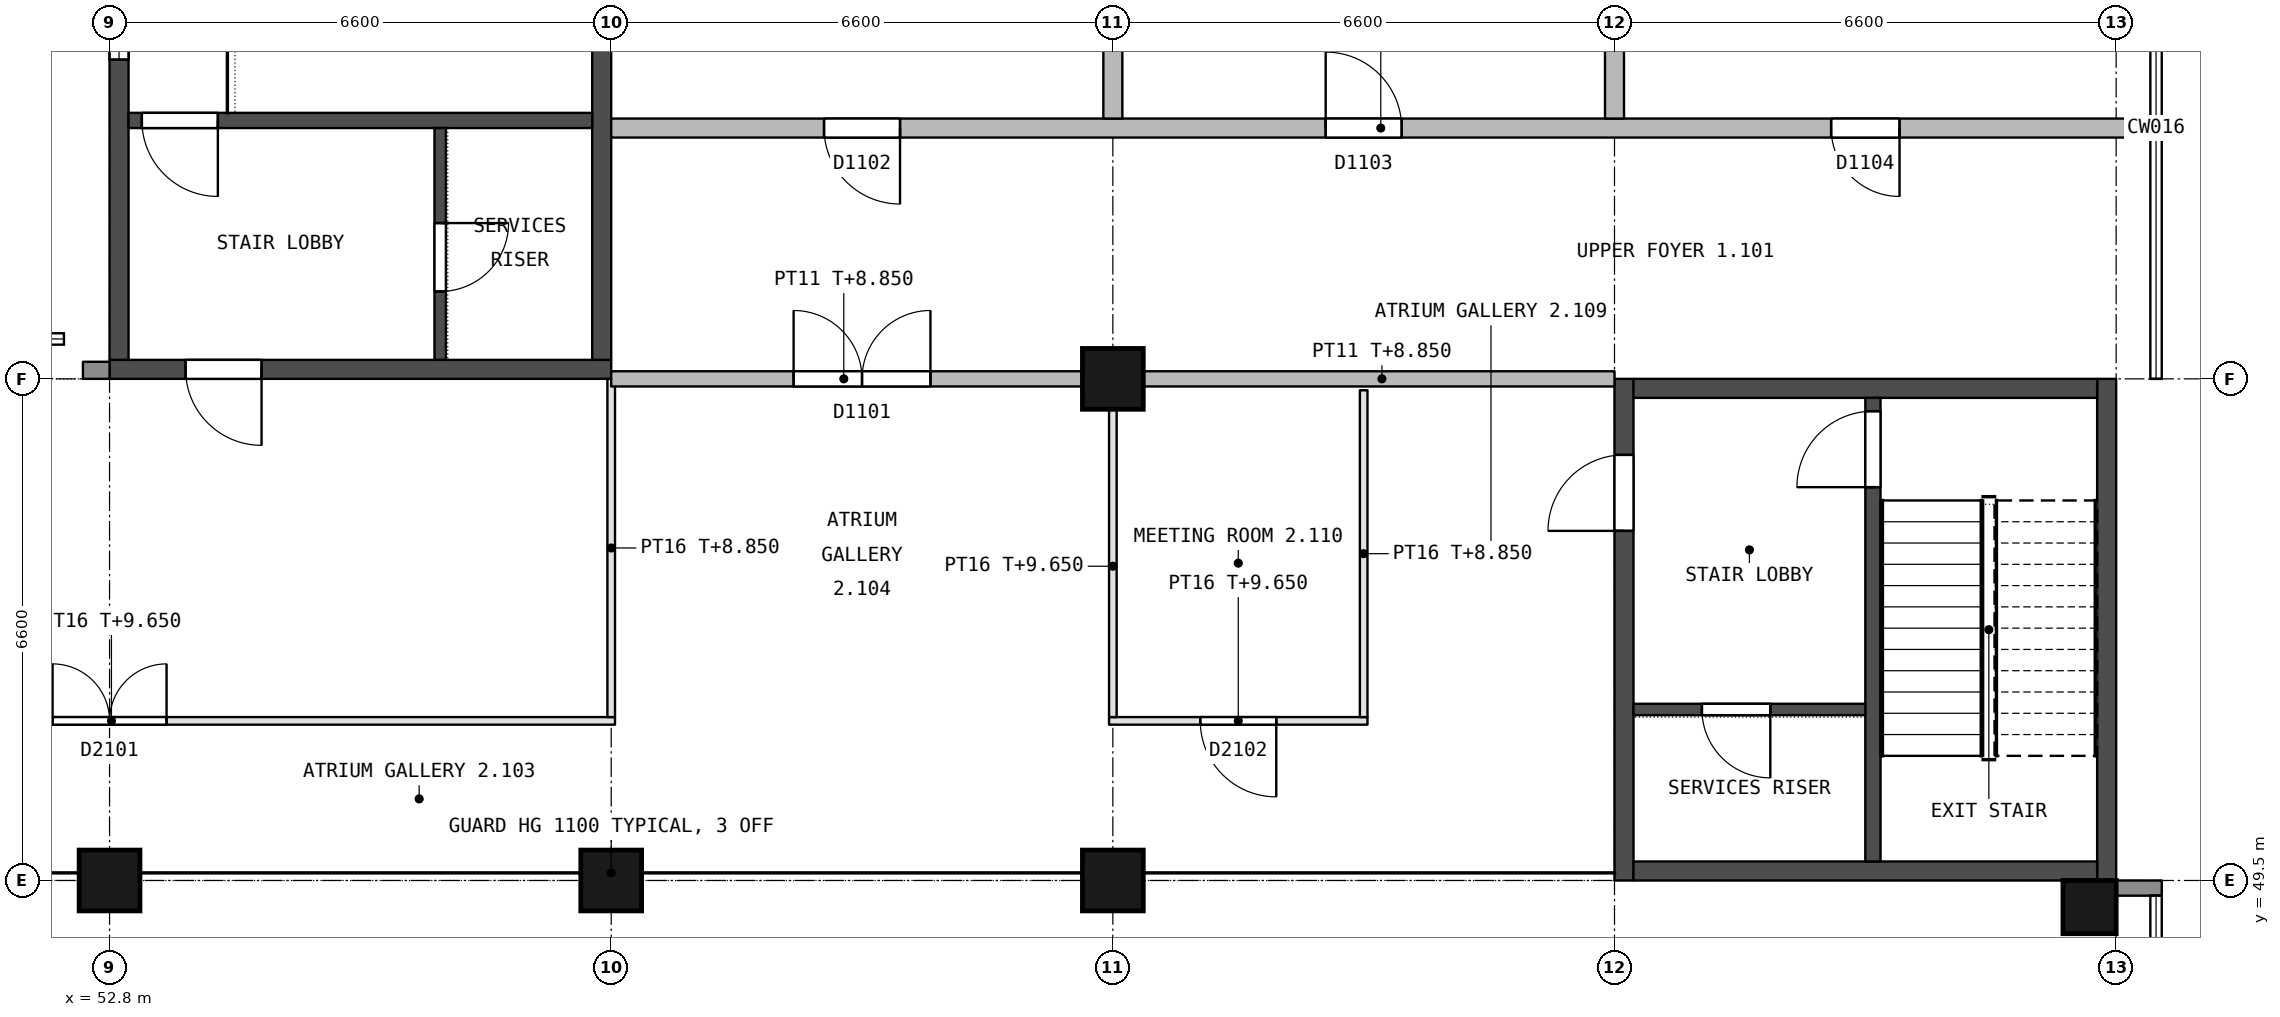
"""IFC4 building model, lengths in metres.
Left out: names, types, materials, properties, quantities, classifications, styles, units other than length and angle.
Written with IfcOpenShell. Run it as: python <this file> out.ifc"""

import sys

from ifc_helpers import new_model, si_unit, direction, frame, frame_2d, origin, origin_2d, place, context, subcontext, project, spatial, rectangle, extrude, element, fill, save


model = new_model("IFC4")
c1 = context("Model", 3, precision=1e-05, world=origin(), true_north=direction((0.0, 1.0)))
c2 = subcontext(c1, "Body", "Model", "MODEL_VIEW")
j1 = project(units=[si_unit("LENGTHUNIT", "METRE"), si_unit("PLANEANGLEUNIT", "RADIAN")], contexts=[c1])
p1 = place(None, origin())
s1 = spatial("IfcSite", under=j1, at=p1, CompositionType="ELEMENT")
p2 = place(p1, origin())
s2 = spatial("IfcBuilding", under=s1, at=p2, CompositionType="ELEMENT")
p3 = place(p2, frame((0.0, 0.0, 5.4)))
s3 = spatial("IfcBuildingStorey", under=s2, at=p3, CompositionType="ELEMENT", Elevation=5.4)
p4 = place(p3, frame((66.0, 56.1, 0.0), z_axis=(0.0, 0.0, 1.0), x_axis=(1.0, 0.0, 0.0)))
e1 = element("IfcColumn", 1, at=p4, inside=s3, PredefinedType="COLUMN", context=c2, shape_type="SweptSolid", body=[
    extrude(rectangle(XDim=0.8, YDim=0.8, at=origin_2d()), origin(), (0.0, 0.0, 1.0), 4.5),
])
p5 = place(p3, frame((78.85, 49.15, 0.0), z_axis=(0.0, 0.0, 1.0), x_axis=(1.0, 0.0, 0.0)))
e2 = element("IfcColumn", 2, at=p5, inside=s3, PredefinedType="COLUMN", context=c2, shape_type="SweptSolid", body=[
    extrude(rectangle(XDim=0.7, YDim=0.7, at=origin_2d()), origin(), (0.0, 0.0, 1.0), 4.5),
])
for number, where, z_axis, x_axis in (
    (3, (52.8, 49.5, 0.0), (0.0, 0.0, 1.0), (1.0, 0.0, 0.0)),
    (4, (59.4, 49.5, 0.0), (0.0, 0.0, 1.0), (1.0, 0.0, 0.0)),
    (5, (66.0, 49.5, 0.0), (0.0, 0.0, 1.0), (1.0, 0.0, 0.0)),
):
    element("IfcColumn", number, at=place(p3, frame(where, z_axis=z_axis, x_axis=x_axis)), inside=s3, PredefinedType="COLUMN", context=c2, shape_type="SweptSolid", body=[
        extrude(rectangle(XDim=0.8, YDim=0.8, at=origin_2d()), origin(), (0.0, 0.0, 1.0), 4.5),
    ])
p6 = place(p3, frame((72.725, 56.1, 0.0), z_axis=(0.0, 0.0, 1.0), x_axis=(0.0, -1.0, 0.0)))
e6 = element("IfcWall", 6, at=p6, inside=s3, PredefinedType="SHEAR", context=c2, shape_type="SweptSolid", body=[
    extrude(rectangle(XDim=6.6, YDim=0.25, at=frame_2d((3.3, 0.0))), origin(), (0.0, 0.0, 1.0), 4.25),
])
p7 = place(p6, frame((1.0, 0.0, 0.0)))
e7 = element("IfcOpeningElement", 7, at=p7, cuts=e6, PredefinedType="OPENING", context=c2, shape_type="SweptSolid", body=[
    extrude(rectangle(XDim=1.0, YDim=2.1, at=frame_2d((0.5, 1.05))), frame((0.0, 0.135, 0.0), z_axis=(0.0, -1.0, 0.0), x_axis=(1.0, 0.0, 0.0)), (0.0, 0.0, 1.0), 0.27),
])
p8 = place(p3, frame((79.075, 56.1, 0.0), z_axis=(0.0, 0.0, 1.0), x_axis=(0.0, -1.0, 0.0)))
e8 = element("IfcWall", 8, at=p8, inside=s3, PredefinedType="SHEAR", context=c2, shape_type="SweptSolid", body=[
    extrude(rectangle(XDim=6.6, YDim=0.25, at=frame_2d((3.3, 0.0))), origin(), (0.0, 0.0, 1.0), 4.25),
])
for number, where, z_axis, x_axis in (
    (9, (72.85, 55.975, 0.0), (0.0, 0.0, 1.0), (1.0, 0.0, 0.0)),
    (10, (72.85, 49.625, 0.0), (0.0, 0.0, 1.0), (1.0, 0.0, 0.0)),
):
    element("IfcWall", number, at=place(p3, frame(where, z_axis=z_axis, x_axis=x_axis)), inside=s3, PredefinedType="SHEAR", context=c2, shape_type="SweptSolid", body=[
        extrude(rectangle(XDim=6.1, YDim=0.25, at=frame_2d((3.05, 0.0))), origin(), (0.0, 0.0, 1.0), 4.25),
    ])
p9 = place(p3, frame((76.0, 55.85, 0.0), z_axis=(0.0, 0.0, 1.0), x_axis=(0.0, -1.0, 0.0)))
e11 = element("IfcWall", 11, at=p9, inside=s3, PredefinedType="SHEAR", context=c2, shape_type="SweptSolid", body=[
    extrude(rectangle(XDim=6.1, YDim=0.2, at=frame_2d((3.05, 0.0))), origin(), (0.0, 0.0, 1.0), 4.25),
])
p10 = place(p9, frame((0.175, 0.0, 0.0)))
e12 = element("IfcOpeningElement", 12, at=p10, cuts=e11, PredefinedType="OPENING", context=c2, shape_type="SweptSolid", body=[
    extrude(rectangle(XDim=1.0, YDim=2.1, at=frame_2d((0.5, 1.05))), frame((0.0, 0.11, 0.0), z_axis=(0.0, -1.0, 0.0), x_axis=(1.0, 0.0, 0.0)), (0.0, 0.0, 1.0), 0.22),
])
p11 = place(p3, frame((72.85, 51.75, 0.0), z_axis=(0.0, 0.0, 1.0), x_axis=(1.0, 0.0, 0.0)))
e13 = element("IfcWall", 13, at=p11, inside=s3, PredefinedType="SHEAR", context=c2, shape_type="SweptSolid", body=[
    extrude(rectangle(XDim=3.05, YDim=0.15, at=frame_2d((1.525, 0.0))), origin(), (0.0, 0.0, 1.0), 4.25),
])
p12 = place(p11, frame((0.9, 0.0, 0.0)))
e14 = element("IfcOpeningElement", 14, at=p12, cuts=e13, PredefinedType="OPENING", context=c2, shape_type="SweptSolid", body=[
    extrude(rectangle(XDim=0.9, YDim=2.1, at=frame_2d((0.45, 1.05))), frame((0.0, 0.085, 0.0), z_axis=(0.0, -1.0, 0.0), x_axis=(1.0, 0.0, 0.0)), (0.0, 0.0, 1.0), 0.17),
])
p13 = place(p3, frame((52.8, 56.225, 0.0), z_axis=(0.0, 0.0, 1.0), x_axis=(1.0, 0.0, 0.0)))
e15 = element("IfcWall", 15, at=p13, inside=s3, PredefinedType="SHEAR", context=c2, shape_type="SweptSolid", body=[
    extrude(rectangle(XDim=6.6, YDim=0.25, at=frame_2d((3.3, 0.0))), origin(), (0.0, 0.0, 1.0), 4.25),
])
p14 = place(p13, frame((1.0, 0.0, 0.0)))
e16 = element("IfcOpeningElement", 16, at=p14, cuts=e15, PredefinedType="OPENING", context=c2, shape_type="SweptSolid", body=[
    extrude(rectangle(XDim=1.0, YDim=2.1, at=frame_2d((0.5, 1.05))), frame((0.0, 0.135, 0.0), z_axis=(0.0, -1.0, 0.0), x_axis=(1.0, 0.0, 0.0)), (0.0, 0.0, 1.0), 0.27),
])
p15 = place(p3, frame((52.925, 56.35, 0.0), z_axis=(0.0, 0.0, 1.0), x_axis=(0.0, 1.0, 0.0)))
e17 = element("IfcWall", 17, at=p15, inside=s3, PredefinedType="SHEAR", context=c2, shape_type="SweptSolid", body=[
    extrude(rectangle(XDim=6.1, YDim=0.25, at=frame_2d((3.05, 0.0))), origin(), (0.0, 0.0, 1.0), 4.25),
])
p16 = place(p15, frame((3.95, 0.0, 0.7)))
e18 = element("IfcOpeningElement", 18, at=p16, cuts=e17, PredefinedType="OPENING", context=c2, shape_type="SweptSolid", body=[
    extrude(rectangle(XDim=1.1, YDim=1.5, at=frame_2d((0.55, 0.75))), frame((0.0, 0.135, 0.0), z_axis=(0.0, -1.0, 0.0), x_axis=(1.0, 0.0, 0.0)), (0.0, 0.0, 1.0), 0.27),
])
p17 = place(p3, frame((59.275, 56.35, 0.0), z_axis=(0.0, 0.0, 1.0), x_axis=(0.0, 1.0, 0.0)))
e19 = element("IfcWall", 19, at=p17, inside=s3, PredefinedType="SHEAR", context=c2, shape_type="SweptSolid", body=[
    extrude(rectangle(XDim=6.1, YDim=0.25, at=frame_2d((3.05, 0.0))), origin(), (0.0, 0.0, 1.0), 4.25),
])
p18 = place(p3, frame((53.05, 59.5, 0.0), z_axis=(0.0, 0.0, 1.0), x_axis=(1.0, 0.0, 0.0)))
e20 = element("IfcWall", 20, at=p18, inside=s3, PredefinedType="SHEAR", context=c2, shape_type="SweptSolid", body=[
    extrude(rectangle(XDim=6.1, YDim=0.2, at=frame_2d((3.05, 0.0))), origin(), (0.0, 0.0, 1.0), 4.25),
])
p19 = place(p18, frame((0.175, 0.0, 0.0)))
e21 = element("IfcOpeningElement", 21, at=p19, cuts=e20, PredefinedType="OPENING", context=c2, shape_type="SweptSolid", body=[
    extrude(rectangle(XDim=1.0, YDim=2.1, at=frame_2d((0.5, 1.05))), frame((0.0, 0.11, 0.0), z_axis=(0.0, -1.0, 0.0), x_axis=(1.0, 0.0, 0.0)), (0.0, 0.0, 1.0), 0.22),
])
p20 = place(p3, frame((57.15, 56.35, 0.0), z_axis=(0.0, 0.0, 1.0), x_axis=(0.0, 1.0, 0.0)))
e22 = element("IfcWall", 22, at=p20, inside=s3, PredefinedType="SHEAR", context=c2, shape_type="SweptSolid", body=[
    extrude(rectangle(XDim=3.05, YDim=0.15, at=frame_2d((1.525, 0.0))), origin(), (0.0, 0.0, 1.0), 4.25),
])
p21 = place(p20, frame((0.9, 0.0, 0.0)))
e23 = element("IfcOpeningElement", 23, at=p21, cuts=e22, PredefinedType="OPENING", context=c2, shape_type="SweptSolid", body=[
    extrude(rectangle(XDim=0.9, YDim=2.1, at=frame_2d((0.45, 1.05))), frame((0.0, 0.085, 0.0), z_axis=(0.0, -1.0, 0.0), x_axis=(1.0, 0.0, 0.0)), (0.0, 0.0, 1.0), 0.17),
])
p22 = place(p3, frame((52.625, 56.1, 0.0), z_axis=(0.0, 0.0, 1.0), x_axis=(0.0, 1.0, 0.0)))
e24 = element("IfcWall", 24, at=p22, inside=s3, PredefinedType="STANDARD", context=c2, shape_type="SweptSolid", body=[
    extrude(rectangle(XDim=0.225, YDim=0.35, at=frame_2d((0.112, 0.0))), origin(), (0.0, 0.0, 1.0), 3.45),
])
p23 = place(p3, frame((79.2, 49.4, 0.0), z_axis=(0.0, 0.0, 1.0), x_axis=(1.0, 0.0, 0.0)))
e25 = element("IfcWall", 25, at=p23, inside=s3, PredefinedType="STANDARD", context=c2, shape_type="SweptSolid", body=[
    extrude(rectangle(XDim=0.6, YDim=0.2, at=frame_2d((0.3, 0.0))), origin(), (0.0, 0.0, 1.0), 4.5),
])
p24 = place(p3, frame((46.2, 51.6, 0.0), z_axis=(0.0, 0.0, 1.0), x_axis=(1.0, 0.0, 0.0)))
e26 = element("IfcWall", 26, at=p24, inside=s3, PredefinedType="PARTITIONING", context=c2, shape_type="SweptSolid", body=[
    extrude(rectangle(XDim=13.25, YDim=0.1, at=frame_2d((6.625, 0.0))), origin(), (0.0, 0.0, 1.0), 4.25),
])
p25 = place(p24, frame((5.85, 0.0, 0.0)))
e27 = element("IfcOpeningElement", 27, at=p25, cuts=e26, PredefinedType="OPENING", context=c2, shape_type="SweptSolid", body=[
    extrude(rectangle(XDim=1.5, YDim=2.1, at=frame_2d((0.75, 1.05))), frame((0.0, 0.06, 0.0), z_axis=(0.0, -1.0, 0.0), x_axis=(1.0, 0.0, 0.0)), (0.0, 0.0, 1.0), 0.12),
])
p26 = place(p3, frame((65.95, 51.6, 0.0), z_axis=(0.0, 0.0, 1.0), x_axis=(1.0, 0.0, 0.0)))
e28 = element("IfcWall", 28, at=p26, inside=s3, PredefinedType="PARTITIONING", context=c2, shape_type="SweptSolid", body=[
    extrude(rectangle(XDim=3.4, YDim=0.1, at=frame_2d((1.7, 0.0))), origin(), (0.0, 0.0, 1.0), 4.25),
])
p27 = place(p26, frame((1.2, 0.0, 0.0)))
e29 = element("IfcOpeningElement", 29, at=p27, cuts=e28, PredefinedType="OPENING", context=c2, shape_type="SweptSolid", body=[
    extrude(rectangle(XDim=1.0, YDim=2.1, at=frame_2d((0.5, 1.05))), frame((0.0, 0.06, 0.0), z_axis=(0.0, -1.0, 0.0), x_axis=(1.0, 0.0, 0.0)), (0.0, 0.0, 1.0), 0.12),
])
p28 = place(p3, frame((59.4, 51.65, 0.0), z_axis=(0.0, 0.0, 1.0), x_axis=(0.0, 1.0, 0.0)))
e30 = element("IfcWall", 30, at=p28, inside=s3, PredefinedType="PARTITIONING", context=c2, shape_type="SweptSolid", body=[
    extrude(rectangle(XDim=4.45, YDim=0.1, at=frame_2d((2.225, 0.0))), origin(), (0.0, 0.0, 1.0), 3.45),
])
p29 = place(p3, frame((66.0, 51.65, 0.0), z_axis=(0.0, 0.0, 1.0), x_axis=(0.0, 1.0, 0.0)))
e31 = element("IfcWall", 31, at=p29, inside=s3, PredefinedType="PARTITIONING", context=c2, shape_type="SweptSolid", body=[
    extrude(rectangle(XDim=4.05, YDim=0.1, at=frame_2d((2.025, 0.0))), origin(), (0.0, 0.0, 1.0), 4.25),
])
p30 = place(p3, frame((69.3, 51.65, 0.0), z_axis=(0.0, 0.0, 1.0), x_axis=(0.0, 1.0, 0.0)))
e32 = element("IfcWall", 32, at=p30, inside=s3, PredefinedType="PARTITIONING", context=c2, shape_type="SweptSolid", body=[
    extrude(rectangle(XDim=4.3, YDim=0.1, at=frame_2d((2.15, 0.0))), origin(), (0.0, 0.0, 1.0), 3.45),
])
p31 = place(p3, frame((59.4, 56.1, 0.0), z_axis=(0.0, 0.0, 1.0), x_axis=(1.0, 0.0, 0.0)))
e33 = element("IfcWall", 33, at=p31, inside=s3, PredefinedType="PARTITIONING", context=c2, shape_type="SweptSolid", body=[
    extrude(rectangle(XDim=6.2, YDim=0.2, at=frame_2d((3.1, 0.0))), origin(), (0.0, 0.0, 1.0), 3.45),
])
p32 = place(p31, frame((2.4, 0.0, 0.0)))
e34 = element("IfcOpeningElement", 34, at=p32, cuts=e33, PredefinedType="OPENING", context=c2, shape_type="SweptSolid", body=[
    extrude(rectangle(XDim=1.8, YDim=2.1, at=frame_2d((0.9, 1.05))), frame((0.0, 0.11, 0.0), z_axis=(0.0, -1.0, 0.0), x_axis=(1.0, 0.0, 0.0)), (0.0, 0.0, 1.0), 0.22),
])
p33 = place(p3, frame((66.4, 56.1, 0.0), z_axis=(0.0, 0.0, 1.0), x_axis=(1.0, 0.0, 0.0)))
e35 = element("IfcWall", 35, at=p33, inside=s3, PredefinedType="PARTITIONING", context=c2, shape_type="SweptSolid", body=[
    extrude(rectangle(XDim=6.2, YDim=0.2, at=frame_2d((3.1, 0.0))), origin(), (0.0, 0.0, 1.0), 3.45),
])
p34 = place(p3, frame((59.4, 59.4, 0.0), z_axis=(0.0, 0.0, 1.0), x_axis=(1.0, 0.0, 0.0)))
e36 = element("IfcWall", 36, at=p34, inside=s3, PredefinedType="PARTITIONING", context=c2, shape_type="SweptSolid", body=[
    extrude(rectangle(XDim=20.25, YDim=0.25, at=frame_2d((10.125, 0.0))), origin(), (0.0, 0.0, 1.0), 4.5),
])
p35 = place(p34, frame((2.8, 0.0, 0.0)))
e37 = element("IfcOpeningElement", 37, at=p35, cuts=e36, PredefinedType="OPENING", context=c2, shape_type="SweptSolid", body=[
    extrude(rectangle(XDim=1.0, YDim=2.1, at=frame_2d((0.5, 1.05))), frame((0.0, 0.135, 0.0), z_axis=(0.0, -1.0, 0.0), x_axis=(1.0, 0.0, 0.0)), (0.0, 0.0, 1.0), 0.27),
])
p36 = place(p34, frame((9.4, 0.0, 0.0)))
e38 = element("IfcOpeningElement", 38, at=p36, cuts=e36, PredefinedType="OPENING", context=c2, shape_type="SweptSolid", body=[
    extrude(rectangle(XDim=1.0, YDim=2.1, at=frame_2d((0.5, 1.05))), frame((0.0, 0.135, 0.0), z_axis=(0.0, -1.0, 0.0), x_axis=(1.0, 0.0, 0.0)), (0.0, 0.0, 1.0), 0.27),
])
p37 = place(p34, frame((16.05, 0.0, 0.0)))
e39 = element("IfcOpeningElement", 39, at=p37, cuts=e36, PredefinedType="OPENING", context=c2, shape_type="SweptSolid", body=[
    extrude(rectangle(XDim=0.9, YDim=2.1, at=frame_2d((0.45, 1.05))), frame((0.0, 0.135, 0.0), z_axis=(0.0, -1.0, 0.0), x_axis=(1.0, 0.0, 0.0)), (0.0, 0.0, 1.0), 0.27),
])
for number, where, z_axis, x_axis in (
    (40, (66.0, 59.525, 0.0), (0.0, 0.0, 1.0), (0.0, 1.0, 0.0)),
    (41, (72.6, 59.525, 0.0), (0.0, 0.0, 1.0), (0.0, 1.0, 0.0)),
):
    element("IfcWall", number, at=place(p3, frame(where, z_axis=z_axis, x_axis=x_axis)), inside=s3, PredefinedType="PARTITIONING", context=c2, shape_type="SweptSolid", body=[
        extrude(rectangle(XDim=2.825, YDim=0.25, at=frame_2d((1.413, 0.0))), origin(), (0.0, 0.0, 1.0), 4.5),
    ])
p38 = place(p12, origin())
e42 = element("IfcDoor", 42, at=p38, inside=s3, OperationType="SINGLE_SWING_RIGHT", PredefinedType="DOOR", context=c2, shape_type="SweptSolid", body=[
    extrude(rectangle(XDim=0.9, YDim=2.1, at=frame_2d((0.45, 1.05))), frame((0.0, 0.025, 0.0), z_axis=(0.0, -1.0, 0.0), x_axis=(1.0, 0.0, 0.0)), (0.0, 0.0, 1.0), 0.05),
])
fill(e14, e42)
p39 = place(p7, origin())
e43 = element("IfcDoor", 43, at=p39, inside=s3, OperationType="SINGLE_SWING_RIGHT", PredefinedType="DOOR", context=c2, shape_type="SweptSolid", body=[
    extrude(rectangle(XDim=1.0, YDim=2.1, at=frame_2d((0.5, 1.05))), frame((0.0, 0.025, 0.0), z_axis=(0.0, -1.0, 0.0), x_axis=(1.0, 0.0, 0.0)), (0.0, 0.0, 1.0), 0.05),
])
fill(e7, e43)
p40 = place(p10, origin())
e44 = element("IfcDoor", 44, at=p40, inside=s3, OperationType="SINGLE_SWING_RIGHT", PredefinedType="DOOR", context=c2, shape_type="SweptSolid", body=[
    extrude(rectangle(XDim=1.0, YDim=2.1, at=frame_2d((0.5, 1.05))), frame((0.0, 0.025, 0.0), z_axis=(0.0, -1.0, 0.0), x_axis=(1.0, 0.0, 0.0)), (0.0, 0.0, 1.0), 0.05),
])
fill(e12, e44)
p41 = place(p21, origin())
e45 = element("IfcDoor", 45, at=p41, inside=s3, OperationType="SINGLE_SWING_RIGHT", PredefinedType="DOOR", context=c2, shape_type="SweptSolid", body=[
    extrude(rectangle(XDim=0.9, YDim=2.1, at=frame_2d((0.45, 1.05))), frame((0.0, 0.025, 0.0), z_axis=(0.0, -1.0, 0.0), x_axis=(1.0, 0.0, 0.0)), (0.0, 0.0, 1.0), 0.05),
])
fill(e23, e45)
p42 = place(p14, origin())
e46 = element("IfcDoor", 46, at=p42, inside=s3, OperationType="SINGLE_SWING_RIGHT", PredefinedType="DOOR", context=c2, shape_type="SweptSolid", body=[
    extrude(rectangle(XDim=1.0, YDim=2.1, at=frame_2d((0.5, 1.05))), frame((0.0, 0.025, 0.0), z_axis=(0.0, -1.0, 0.0), x_axis=(1.0, 0.0, 0.0)), (0.0, 0.0, 1.0), 0.05),
])
fill(e16, e46)
p43 = place(p19, origin())
e47 = element("IfcDoor", 47, at=p43, inside=s3, OperationType="SINGLE_SWING_RIGHT", PredefinedType="DOOR", context=c2, shape_type="SweptSolid", body=[
    extrude(rectangle(XDim=1.0, YDim=2.1, at=frame_2d((0.5, 1.05))), frame((0.0, 0.025, 0.0), z_axis=(0.0, -1.0, 0.0), x_axis=(1.0, 0.0, 0.0)), (0.0, 0.0, 1.0), 0.05),
])
fill(e21, e47)
p44 = place(p16, origin())
e48 = element("IfcWindow", 48, at=p44, inside=s3, PartitioningType="SINGLE_PANEL", PredefinedType="WINDOW", context=c2, shape_type="SweptSolid", body=[
    extrude(rectangle(XDim=1.1, YDim=1.5, at=frame_2d((0.55, 0.75))), frame((0.0, 0.03, 0.0), z_axis=(0.0, -1.0, 0.0), x_axis=(1.0, 0.0, 0.0)), (0.0, 0.0, 1.0), 0.06),
])
fill(e18, e48)
p45 = place(p25, origin())
e49 = element("IfcDoor", 49, at=p45, inside=s3, OperationType="DOUBLE_DOOR_SINGLE_SWING", PredefinedType="DOOR", context=c2, shape_type="SweptSolid", body=[
    extrude(rectangle(XDim=1.5, YDim=2.1, at=frame_2d((0.75, 1.05))), frame((0.0, 0.025, 0.0), z_axis=(0.0, -1.0, 0.0), x_axis=(1.0, 0.0, 0.0)), (0.0, 0.0, 1.0), 0.05),
])
fill(e27, e49)
p46 = place(p27, origin())
e50 = element("IfcDoor", 50, at=p46, inside=s3, OperationType="SINGLE_SWING_RIGHT", PredefinedType="DOOR", context=c2, shape_type="SweptSolid", body=[
    extrude(rectangle(XDim=1.0, YDim=2.1, at=frame_2d((0.5, 1.05))), frame((0.0, 0.025, 0.0), z_axis=(0.0, -1.0, 0.0), x_axis=(1.0, 0.0, 0.0)), (0.0, 0.0, 1.0), 0.05),
])
fill(e29, e50)
p47 = place(p32, origin())
e51 = element("IfcDoor", 51, at=p47, inside=s3, OperationType="DOUBLE_DOOR_SINGLE_SWING", PredefinedType="DOOR", context=c2, shape_type="SweptSolid", body=[
    extrude(rectangle(XDim=1.8, YDim=2.1, at=frame_2d((0.9, 1.05))), frame((0.0, 0.025, 0.0), z_axis=(0.0, -1.0, 0.0), x_axis=(1.0, 0.0, 0.0)), (0.0, 0.0, 1.0), 0.05),
])
fill(e34, e51)
p48 = place(p35, origin())
e52 = element("IfcDoor", 52, at=p48, inside=s3, OperationType="SINGLE_SWING_RIGHT", PredefinedType="DOOR", context=c2, shape_type="SweptSolid", body=[
    extrude(rectangle(XDim=1.0, YDim=2.1, at=frame_2d((0.5, 1.05))), frame((0.0, 0.025, 0.0), z_axis=(0.0, -1.0, 0.0), x_axis=(1.0, 0.0, 0.0)), (0.0, 0.0, 1.0), 0.05),
])
fill(e37, e52)
p49 = place(p36, origin())
e53 = element("IfcDoor", 53, at=p49, inside=s3, OperationType="SINGLE_SWING_LEFT", PredefinedType="DOOR", context=c2, shape_type="SweptSolid", body=[
    extrude(rectangle(XDim=1.0, YDim=2.1, at=frame_2d((0.5, 1.05))), frame((0.0, 0.025, 0.0), z_axis=(0.0, -1.0, 0.0), x_axis=(1.0, 0.0, 0.0)), (0.0, 0.0, 1.0), 0.05),
])
fill(e38, e53)
p50 = place(p37, origin())
e54 = element("IfcDoor", 54, at=p50, inside=s3, OperationType="SINGLE_SWING_RIGHT", PredefinedType="DOOR", context=c2, shape_type="SweptSolid", body=[
    extrude(rectangle(XDim=0.9, YDim=2.1, at=frame_2d((0.45, 1.05))), frame((0.0, 0.025, 0.0), z_axis=(0.0, -1.0, 0.0), x_axis=(1.0, 0.0, 0.0)), (0.0, 0.0, 1.0), 0.05),
])
fill(e39, e54)
save(model, sys.argv[1])
